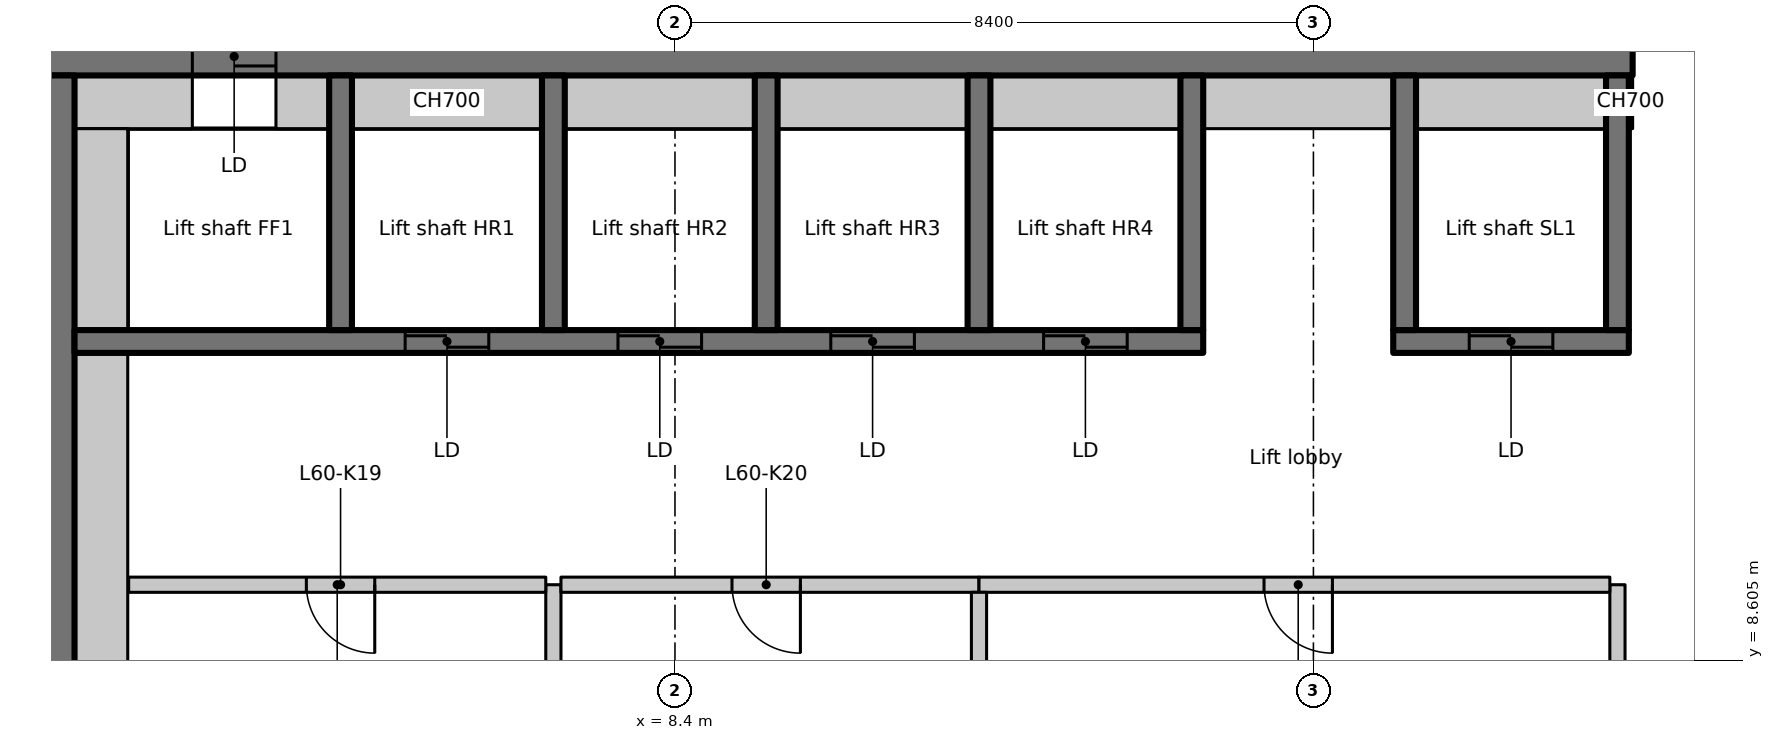
"""IFC4 building model, lengths in metres.
Left out: names, types, materials, properties, quantities, classifications, styles, units other than length and angle.
Written with IfcOpenShell. Run it as: python <this file> out.ifc"""

import sys

from ifc_helpers import new_model, si_unit, direction, frame, frame_2d, origin, place, context, subcontext, project, spatial, rectangle, extrude, element, fill, save


model = new_model("IFC4")
c1 = context("Model", 3, precision=1e-05, world=origin(), true_north=direction((0.0, 1.0)))
c2 = subcontext(c1, "Body", "Model", "MODEL_VIEW")
j1 = project(units=[si_unit("LENGTHUNIT", "METRE"), si_unit("PLANEANGLEUNIT", "RADIAN")], contexts=[c1])
p1 = place(None, origin())
s1 = spatial("IfcSite", under=j1, at=p1, CompositionType="ELEMENT")
p2 = place(p1, origin())
s2 = spatial("IfcBuilding", under=s1, at=p2, CompositionType="ELEMENT")
p3 = place(p2, frame((0.0, 0.0, 237.3)))
s3 = spatial("IfcBuildingStorey", under=s2, at=p3, CompositionType="ELEMENT", Elevation=237.3)
p4 = place(p3, frame((-1.1, 16.55, 0.0), z_axis=(0.0, 0.0, 1.0), x_axis=(1.0, 0.0, 0.0)))
e1 = element("IfcWall", 1, at=p4, inside=s3, PredefinedType="SHEAR", context=c2, shape_type="SweptSolid", body=[
    extrude(rectangle(XDim=22.1, YDim=0.5, at=frame_2d((11.05, 0.0))), origin(), (0.0, 0.0, 1.0), 3.35),
])
p5 = place(p4, frame((3.15, 0.0, 0.0)))
e2 = element("IfcOpeningElement", 2, at=p5, cuts=e1, PredefinedType="OPENING", context=c2, shape_type="SweptSolid", body=[
    extrude(rectangle(XDim=1.1, YDim=2.3, at=frame_2d((0.55, 1.15))), frame((0.0, 0.26, 0.0), z_axis=(0.0, -1.0, 0.0), x_axis=(1.0, 0.0, 0.0)), (0.0, 0.0, 1.0), 0.52),
])
p6 = place(p3, frame((0.25, 7.436, 0.0), z_axis=(0.0, 0.0, 1.0), x_axis=(0.0, 1.0, 0.0)))
e3 = element("IfcWall", 3, at=p6, inside=s3, PredefinedType="SHEAR", context=c2, shape_type="SweptSolid", body=[
    extrude(rectangle(XDim=8.864, YDim=0.5, at=frame_2d((4.432, 0.0))), origin(), (0.0, 0.0, 1.0), 3.35),
])
p7 = place(p3, frame((0.5, 15.95, 0.0), z_axis=(0.0, 0.0, 1.0), x_axis=(1.0, 0.0, 0.0)))
e4 = element("IfcWall", 4, at=p7, inside=s3, PredefinedType="PARTITIONING", context=c2, shape_type="SweptSolid", body=[
    extrude(rectangle(XDim=1.55, YDim=0.7, at=frame_2d((0.775, 0.0))), origin(), (0.0, 0.0, 1.0), 3.35),
])
p8 = place(p3, frame((0.5, 12.8, 0.0), z_axis=(0.0, 0.0, 1.0), x_axis=(1.0, 0.0, 0.0)))
e5 = element("IfcWall", 5, at=p8, inside=s3, PredefinedType="SHEAR", context=c2, shape_type="SweptSolid", body=[
    extrude(rectangle(XDim=14.85, YDim=0.3, at=frame_2d((7.425, 0.0))), origin(), (0.0, 0.0, 1.0), 3.35),
])
p9 = place(p8, frame((4.35, 0.0, 0.0)))
e6 = element("IfcOpeningElement", 6, at=p9, cuts=e5, PredefinedType="OPENING", context=c2, shape_type="SweptSolid", body=[
    extrude(rectangle(XDim=1.1, YDim=2.3, at=frame_2d((0.55, 1.15))), frame((0.0, 0.16, 0.0), z_axis=(0.0, -1.0, 0.0), x_axis=(1.0, 0.0, 0.0)), (0.0, 0.0, 1.0), 0.32),
])
p10 = place(p8, frame((7.15, 0.0, 0.0)))
e7 = element("IfcOpeningElement", 7, at=p10, cuts=e5, PredefinedType="OPENING", context=c2, shape_type="SweptSolid", body=[
    extrude(rectangle(XDim=1.1, YDim=2.3, at=frame_2d((0.55, 1.15))), frame((0.0, 0.16, 0.0), z_axis=(0.0, -1.0, 0.0), x_axis=(1.0, 0.0, 0.0)), (0.0, 0.0, 1.0), 0.32),
])
p11 = place(p8, frame((9.95, 0.0, 0.0)))
e8 = element("IfcOpeningElement", 8, at=p11, cuts=e5, PredefinedType="OPENING", context=c2, shape_type="SweptSolid", body=[
    extrude(rectangle(XDim=1.1, YDim=2.3, at=frame_2d((0.55, 1.15))), frame((0.0, 0.16, 0.0), z_axis=(0.0, -1.0, 0.0), x_axis=(1.0, 0.0, 0.0)), (0.0, 0.0, 1.0), 0.32),
])
p12 = place(p8, frame((12.75, 0.0, 0.0)))
e9 = element("IfcOpeningElement", 9, at=p12, cuts=e5, PredefinedType="OPENING", context=c2, shape_type="SweptSolid", body=[
    extrude(rectangle(XDim=1.1, YDim=2.3, at=frame_2d((0.55, 1.15))), frame((0.0, 0.16, 0.0), z_axis=(0.0, -1.0, 0.0), x_axis=(1.0, 0.0, 0.0)), (0.0, 0.0, 1.0), 0.32),
])
for number, where, z_axis, x_axis in (
    (10, (4.0, 12.95, 0.0), (0.0, 0.0, 1.0), (0.0, 1.0, 0.0)),
    (11, (6.8, 12.95, 0.0), (0.0, 0.0, 1.0), (0.0, 1.0, 0.0)),
    (12, (9.6, 12.95, 0.0), (0.0, 0.0, 1.0), (0.0, 1.0, 0.0)),
    (13, (12.4, 12.95, 0.0), (0.0, 0.0, 1.0), (0.0, 1.0, 0.0)),
    (14, (15.2, 12.95, 0.0), (0.0, 0.0, 1.0), (0.0, 1.0, 0.0)),
):
    element("IfcWall", number, at=place(p3, frame(where, z_axis=z_axis, x_axis=x_axis)), inside=s3, PredefinedType="SHEAR", context=c2, shape_type="SweptSolid", body=[
        extrude(rectangle(XDim=3.35, YDim=0.3, at=frame_2d((1.675, 0.0))), origin(), (0.0, 0.0, 1.0), 3.35),
    ])
p13 = place(p3, frame((17.85, 12.8, 0.0), z_axis=(0.0, 0.0, 1.0), x_axis=(1.0, 0.0, 0.0)))
e15 = element("IfcWall", 15, at=p13, inside=s3, PredefinedType="SHEAR", context=c2, shape_type="SweptSolid", body=[
    extrude(rectangle(XDim=3.1, YDim=0.3, at=frame_2d((1.55, 0.0))), origin(), (0.0, 0.0, 1.0), 3.35),
])
p14 = place(p13, frame((1.0, 0.0, 0.0)))
e16 = element("IfcOpeningElement", 16, at=p14, cuts=e15, PredefinedType="OPENING", context=c2, shape_type="SweptSolid", body=[
    extrude(rectangle(XDim=1.1, YDim=2.3, at=frame_2d((0.55, 1.15))), frame((0.0, 0.16, 0.0), z_axis=(0.0, -1.0, 0.0), x_axis=(1.0, 0.0, 0.0)), (0.0, 0.0, 1.0), 0.32),
])
for number, where, z_axis, x_axis in (
    (17, (18.0, 12.95, 0.0), (0.0, 0.0, 1.0), (0.0, 1.0, 0.0)),
    (18, (20.8, 12.95, 0.0), (0.0, 0.0, 1.0), (0.0, 1.0, 0.0)),
):
    element("IfcWall", number, at=place(p3, frame(where, z_axis=z_axis, x_axis=x_axis)), inside=s3, PredefinedType="SHEAR", context=c2, shape_type="SweptSolid", body=[
        extrude(rectangle(XDim=3.35, YDim=0.3, at=frame_2d((1.675, 0.0))), origin(), (0.0, 0.0, 1.0), 3.35),
    ])
p15 = place(p3, frame((6.8, 9.6, 0.0), z_axis=(0.0, 0.0, 1.0), x_axis=(0.0, -1.0, 0.0)))
e19 = element("IfcWall", 19, at=p15, inside=s3, PredefinedType="PARTITIONING", context=c2, shape_type="SweptSolid", body=[
    extrude(rectangle(XDim=2.5, YDim=0.2, at=frame_2d((1.25, 0.0))), origin(), (0.0, 0.0, 1.0), 3.35),
])
p16 = place(p3, frame((6.7, 9.6, 0.0), z_axis=(0.0, 0.0, 1.0), x_axis=(-1.0, 0.0, 0.0)))
e20 = element("IfcWall", 20, at=p16, inside=s3, PredefinedType="PARTITIONING", context=c2, shape_type="SweptSolid", body=[
    extrude(rectangle(XDim=5.488, YDim=0.2, at=frame_2d((2.744, 0.0))), origin(), (0.0, 0.0, 1.0), 3.35),
])
p17 = place(p16, frame((2.25, 0.0, 0.0)))
e21 = element("IfcOpeningElement", 21, at=p17, cuts=e20, PredefinedType="OPENING", context=c2, shape_type="SweptSolid", body=[
    extrude(rectangle(XDim=0.9, YDim=2.1, at=frame_2d((0.45, 1.05))), frame((0.0, 0.11, 0.0), z_axis=(0.0, -1.0, 0.0), x_axis=(1.0, 0.0, 0.0)), (0.0, 0.0, 1.0), 0.22),
])
p18 = place(p3, frame((12.4, 9.6, 0.0), z_axis=(0.0, 0.0, 1.0), x_axis=(-1.0, 0.0, 0.0)))
e22 = element("IfcWall", 22, at=p18, inside=s3, PredefinedType="PARTITIONING", context=c2, shape_type="SweptSolid", body=[
    extrude(rectangle(XDim=5.5, YDim=0.2, at=frame_2d((2.75, 0.0))), origin(), (0.0, 0.0, 1.0), 3.35),
])
p19 = place(p18, frame((2.35, 0.0, 0.0)))
e23 = element("IfcOpeningElement", 23, at=p19, cuts=e22, PredefinedType="OPENING", context=c2, shape_type="SweptSolid", body=[
    extrude(rectangle(XDim=0.9, YDim=2.1, at=frame_2d((0.45, 1.05))), frame((0.0, 0.11, 0.0), z_axis=(0.0, -1.0, 0.0), x_axis=(1.0, 0.0, 0.0)), (0.0, 0.0, 1.0), 0.22),
])
p20 = place(p3, frame((20.8, 7.1, 0.0), z_axis=(0.0, 0.0, 1.0), x_axis=(0.0, 1.0, 0.0)))
e24 = element("IfcWall", 24, at=p20, inside=s3, PredefinedType="PARTITIONING", context=c2, shape_type="SweptSolid", body=[
    extrude(rectangle(XDim=2.5, YDim=0.2, at=frame_2d((1.25, 0.0))), origin(), (0.0, 0.0, 1.0), 3.35),
])
p21 = place(p3, frame((20.7, 9.6, 0.0), z_axis=(0.0, 0.0, 1.0), x_axis=(-1.0, 0.0, 0.0)))
e25 = element("IfcWall", 25, at=p21, inside=s3, PredefinedType="PARTITIONING", context=c2, shape_type="SweptSolid", body=[
    extrude(rectangle(XDim=8.3, YDim=0.2, at=frame_2d((4.15, 0.0))), origin(), (0.0, 0.0, 1.0), 3.35),
])
p22 = place(p21, frame((3.65, 0.0, 0.0)))
e26 = element("IfcOpeningElement", 26, at=p22, cuts=e25, PredefinedType="OPENING", context=c2, shape_type="SweptSolid", body=[
    extrude(rectangle(XDim=0.9, YDim=2.1, at=frame_2d((0.45, 1.05))), frame((0.0, 0.11, 0.0), z_axis=(0.0, -1.0, 0.0), x_axis=(1.0, 0.0, 0.0)), (0.0, 0.0, 1.0), 0.22),
])
p23 = place(p3, frame((12.4, 9.5, 0.0), z_axis=(0.0, 0.0, 1.0), x_axis=(0.0, -1.0, 0.0)))
e27 = element("IfcWall", 27, at=p23, inside=s3, PredefinedType="PARTITIONING", context=c2, shape_type="SweptSolid", body=[
    extrude(rectangle(XDim=2.4, YDim=0.2, at=frame_2d((1.2, 0.0))), origin(), (0.0, 0.0, 1.0), 3.35),
])
p24 = place(p3, frame((0.85, 7.436, 0.0), z_axis=(0.0, 0.0, 1.0), x_axis=(0.0, 1.0, 0.0)))
e28 = element("IfcWall", 28, at=p24, inside=s3, PredefinedType="PARTITIONING", context=c2, shape_type="SweptSolid", body=[
    extrude(rectangle(XDim=5.214, YDim=0.7, at=frame_2d((2.607, 0.0))), origin(), (0.0, 0.0, 1.0), 3.35),
])
p25 = place(p3, frame((0.85, 12.95, 0.0), z_axis=(0.0, 0.0, 1.0), x_axis=(0.0, 1.0, 0.0)))
e29 = element("IfcWall", 29, at=p25, inside=s3, PredefinedType="PARTITIONING", context=c2, shape_type="SweptSolid", body=[
    extrude(rectangle(XDim=2.65, YDim=0.7, at=frame_2d((1.325, 0.0))), origin(), (0.0, 0.0, 1.0), 3.35),
])
p26 = place(p3, frame((3.15, 15.95, 0.0), z_axis=(0.0, 0.0, 1.0), x_axis=(1.0, 0.0, 0.0)))
e30 = element("IfcWall", 30, at=p26, inside=s3, PredefinedType="PARTITIONING", context=c2, shape_type="SweptSolid", body=[
    extrude(rectangle(XDim=0.7, YDim=0.7, at=frame_2d((0.35, 0.0))), origin(), (0.0, 0.0, 1.0), 3.35),
])
for number, where, z_axis, x_axis in (
    (31, (4.15, 15.95, 0.0), (0.0, 0.0, 1.0), (1.0, 0.0, 0.0)),
    (32, (6.95, 15.95, 0.0), (0.0, 0.0, 1.0), (1.0, 0.0, 0.0)),
    (33, (9.75, 15.95, 0.0), (0.0, 0.0, 1.0), (1.0, 0.0, 0.0)),
    (34, (12.55, 15.95, 0.0), (0.0, 0.0, 1.0), (1.0, 0.0, 0.0)),
    (35, (15.35, 15.95, 0.0), (0.0, 0.0, 1.0), (1.0, 0.0, 0.0)),
    (36, (18.15, 15.95, 0.0), (0.0, 0.0, 1.0), (1.0, 0.0, 0.0)),
):
    element("IfcWall", number, at=place(p3, frame(where, z_axis=z_axis, x_axis=x_axis)), inside=s3, PredefinedType="PARTITIONING", context=c2, shape_type="SweptSolid", body=[
        extrude(rectangle(XDim=2.5, YDim=0.7, at=frame_2d((1.25, 0.0))), origin(), (0.0, 0.0, 1.0), 3.35),
    ])
p27 = place(p3, frame((20.95, 15.95, 0.0), z_axis=(0.0, 0.0, 1.0), x_axis=(1.0, 0.0, 0.0)))
e37 = element("IfcWall", 37, at=p27, inside=s3, PredefinedType="PARTITIONING", context=c2, shape_type="SweptSolid", body=[
    extrude(rectangle(XDim=0.05, YDim=0.7, at=frame_2d((0.025, 0.0))), origin(), (0.0, 0.0, 1.0), 3.35),
])
p28 = place(p5, origin())
e38 = element("IfcDoor", 38, at=p28, inside=s3, OperationType="SLIDING_TO_LEFT", PredefinedType="DOOR", context=c2, shape_type="SweptSolid", body=[
    extrude(rectangle(XDim=1.1, YDim=2.3, at=frame_2d((0.55, 1.15))), frame((0.0, 0.025, 0.0), z_axis=(0.0, -1.0, 0.0), x_axis=(1.0, 0.0, 0.0)), (0.0, 0.0, 1.0), 0.05),
])
fill(e2, e38)
p29 = place(p9, origin())
e39 = element("IfcDoor", 39, at=p29, inside=s3, OperationType="SLIDING_TO_LEFT", PredefinedType="DOOR", context=c2, shape_type="SweptSolid", body=[
    extrude(rectangle(XDim=1.1, YDim=2.3, at=frame_2d((0.55, 1.15))), frame((0.0, 0.025, 0.0), z_axis=(0.0, -1.0, 0.0), x_axis=(1.0, 0.0, 0.0)), (0.0, 0.0, 1.0), 0.05),
])
fill(e6, e39)
p30 = place(p10, origin())
e40 = element("IfcDoor", 40, at=p30, inside=s3, OperationType="SLIDING_TO_LEFT", PredefinedType="DOOR", context=c2, shape_type="SweptSolid", body=[
    extrude(rectangle(XDim=1.1, YDim=2.3, at=frame_2d((0.55, 1.15))), frame((0.0, 0.025, 0.0), z_axis=(0.0, -1.0, 0.0), x_axis=(1.0, 0.0, 0.0)), (0.0, 0.0, 1.0), 0.05),
])
fill(e7, e40)
p31 = place(p11, origin())
e41 = element("IfcDoor", 41, at=p31, inside=s3, OperationType="SLIDING_TO_LEFT", PredefinedType="DOOR", context=c2, shape_type="SweptSolid", body=[
    extrude(rectangle(XDim=1.1, YDim=2.3, at=frame_2d((0.55, 1.15))), frame((0.0, 0.025, 0.0), z_axis=(0.0, -1.0, 0.0), x_axis=(1.0, 0.0, 0.0)), (0.0, 0.0, 1.0), 0.05),
])
fill(e8, e41)
p32 = place(p12, origin())
e42 = element("IfcDoor", 42, at=p32, inside=s3, OperationType="SLIDING_TO_LEFT", PredefinedType="DOOR", context=c2, shape_type="SweptSolid", body=[
    extrude(rectangle(XDim=1.1, YDim=2.3, at=frame_2d((0.55, 1.15))), frame((0.0, 0.025, 0.0), z_axis=(0.0, -1.0, 0.0), x_axis=(1.0, 0.0, 0.0)), (0.0, 0.0, 1.0), 0.05),
])
fill(e9, e42)
p33 = place(p14, origin())
e43 = element("IfcDoor", 43, at=p33, inside=s3, OperationType="SLIDING_TO_LEFT", PredefinedType="DOOR", context=c2, shape_type="SweptSolid", body=[
    extrude(rectangle(XDim=1.1, YDim=2.3, at=frame_2d((0.55, 1.15))), frame((0.0, 0.025, 0.0), z_axis=(0.0, -1.0, 0.0), x_axis=(1.0, 0.0, 0.0)), (0.0, 0.0, 1.0), 0.05),
])
fill(e16, e43)
p34 = place(p17, origin())
e44 = element("IfcDoor", 44, at=p34, inside=s3, OperationType="SINGLE_SWING_RIGHT", PredefinedType="DOOR", context=c2, shape_type="SweptSolid", body=[
    extrude(rectangle(XDim=0.9, YDim=2.1, at=frame_2d((0.45, 1.05))), frame((0.0, 0.025, 0.0), z_axis=(0.0, -1.0, 0.0), x_axis=(1.0, 0.0, 0.0)), (0.0, 0.0, 1.0), 0.05),
])
fill(e21, e44)
p35 = place(p19, origin())
e45 = element("IfcDoor", 45, at=p35, inside=s3, OperationType="SINGLE_SWING_LEFT", PredefinedType="DOOR", context=c2, shape_type="SweptSolid", body=[
    extrude(rectangle(XDim=0.9, YDim=2.1, at=frame_2d((0.45, 1.05))), frame((0.0, 0.025, 0.0), z_axis=(0.0, -1.0, 0.0), x_axis=(1.0, 0.0, 0.0)), (0.0, 0.0, 1.0), 0.05),
])
fill(e23, e45)
p36 = place(p22, origin())
e46 = element("IfcDoor", 46, at=p36, inside=s3, OperationType="SINGLE_SWING_RIGHT", PredefinedType="DOOR", context=c2, shape_type="SweptSolid", body=[
    extrude(rectangle(XDim=0.9, YDim=2.1, at=frame_2d((0.45, 1.05))), frame((0.0, 0.025, 0.0), z_axis=(0.0, -1.0, 0.0), x_axis=(1.0, 0.0, 0.0)), (0.0, 0.0, 1.0), 0.05),
])
fill(e26, e46)
save(model, sys.argv[1])
